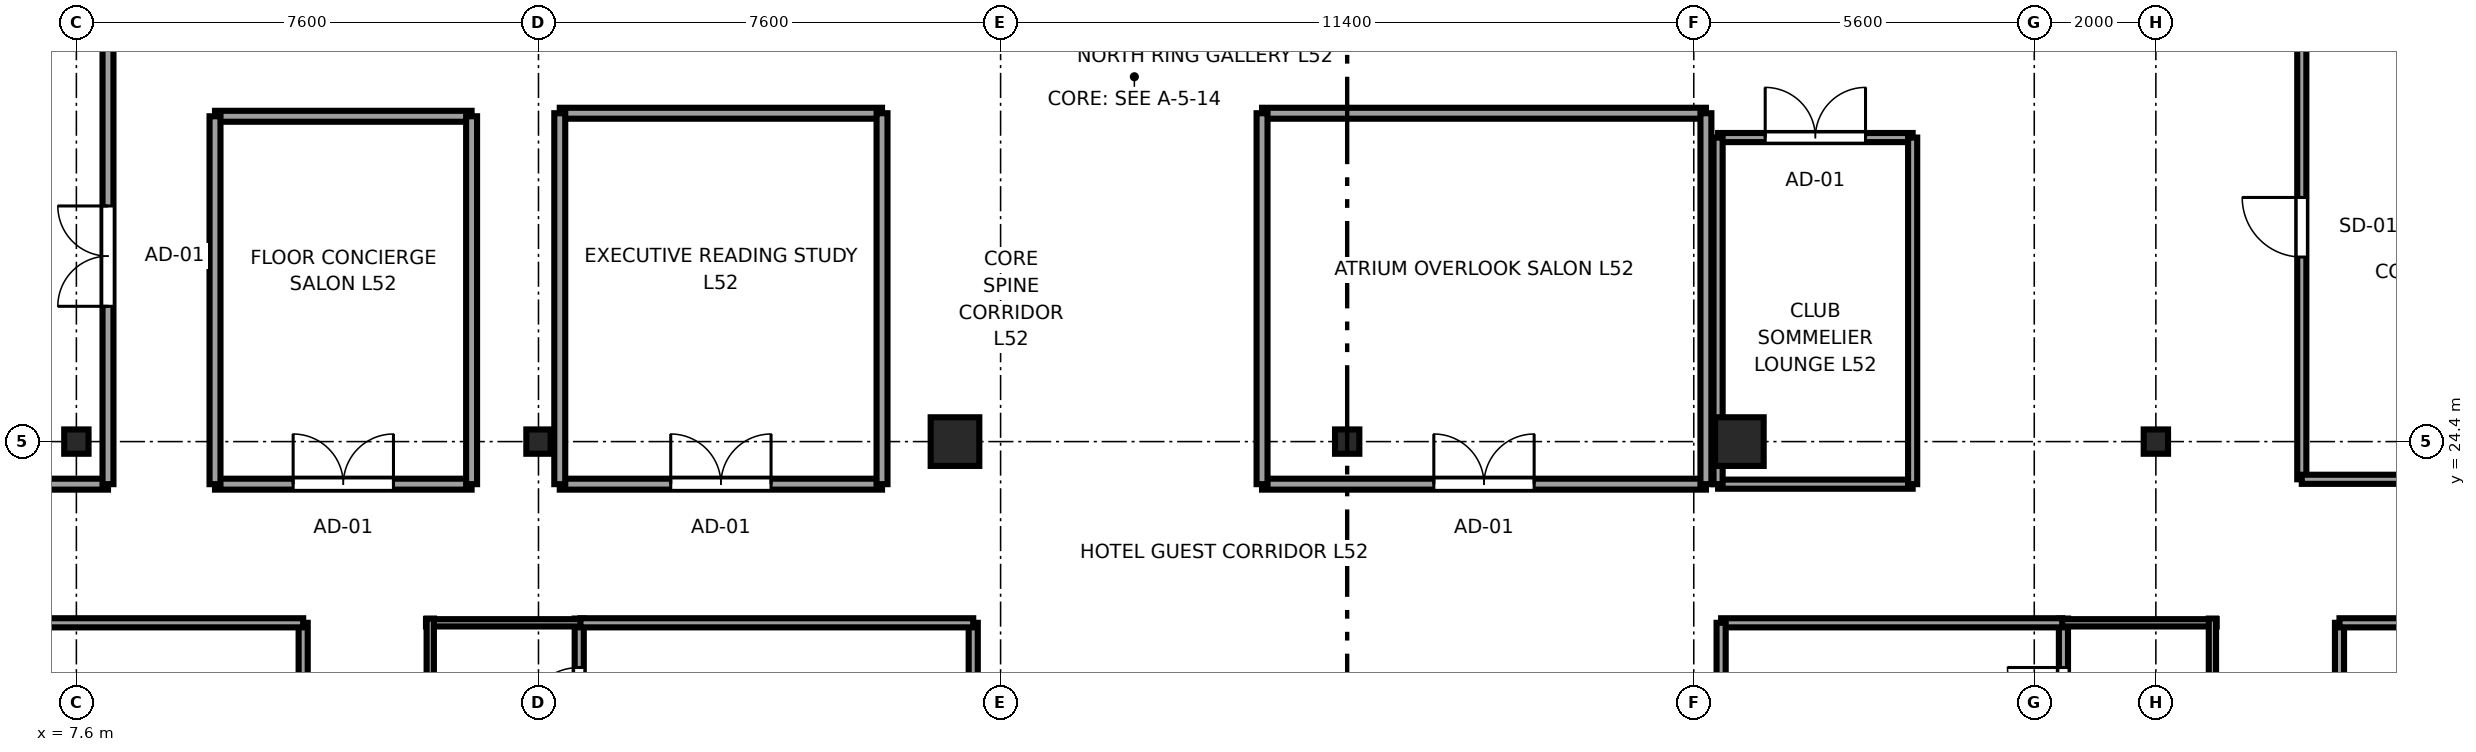
"""IFC4 building model, lengths in metres.
Left out: names, types, materials, properties, quantities, classifications, styles, units other than length and angle.
Written with IfcOpenShell. Run it as: python <this file> out.ifc"""

import sys

from ifc_helpers import new_model, si_unit, direction, frame, frame_2d, origin, origin_2d, place, context, subcontext, project, spatial, rectangle, i_section, extrude, source, transform, mapped, element, fill, save


model = new_model("IFC4")
c1 = context("Model", 3, precision=1e-05, world=origin(), true_north=direction((0.0, 1.0)))
c2 = subcontext(c1, "Body", "Model", "MODEL_VIEW")
j1 = project(units=[si_unit("LENGTHUNIT", "METRE"), si_unit("PLANEANGLEUNIT", "RADIAN")], contexts=[c1])
p1 = place(None, origin())
s1 = spatial("IfcSite", under=j1, at=p1, CompositionType="ELEMENT")
p2 = place(p1, origin())
s2 = spatial("IfcBuilding", under=s1, at=p2, CompositionType="ELEMENT")
p3 = place(p2, frame((0.0, 0.0, 198.2)))
s3 = spatial("IfcBuildingStorey", under=s2, at=p3, CompositionType="ELEMENT", Elevation=198.2)
m1 = source(origin(), c2, "Body", "SweptSolid", [
    extrude(i_section(OverallWidth=0.4, OverallDepth=0.4, WebThickness=0.02, FlangeThickness=0.035, at=origin_2d()), origin(), (0.0, 0.0, 1.0), 3.55),
])
for number, where, z_axis, x_axis in (
    (1, (7.6, 24.4, 0.0), (0.0, 0.0, 1.0), (1.0, 0.0, 0.0)),
    (2, (15.2, 24.4, 0.0), (0.0, 0.0, 1.0), (1.0, 0.0, 0.0)),
):
    element("IfcColumn", number, at=place(p3, frame(where, z_axis=z_axis, x_axis=x_axis)), inside=s3, PredefinedType="COLUMN", context=c2, shape_type="MappedRepresentation", body=[
        mapped(m1, transform((0.0, 0.0, 0.0), x_axis=(1.0, 0.0, 0.0), y_axis=(0.0, 1.0, 0.0), z_axis=(0.0, 0.0, 1.0), scale=1.0)),
    ])
m2 = source(origin(), c2, "Body", "SweptSolid", [
    extrude(rectangle(XDim=0.8, YDim=0.8, at=origin_2d()), origin(), (0.0, 0.0, 1.0), 3.55),
])
for number, where, z_axis, x_axis in (
    (3, (22.05, 24.4, 0.0), (0.0, 0.0, 1.0), (1.0, 0.0, 0.0)),
    (4, (34.95, 24.4, 0.0), (0.0, 0.0, 1.0), (1.0, 0.0, 0.0)),
):
    element("IfcColumn", number, at=place(p3, frame(where, z_axis=z_axis, x_axis=x_axis)), inside=s3, PredefinedType="COLUMN", context=c2, shape_type="MappedRepresentation", body=[
        mapped(m2, transform((0.0, 0.0, 0.0), x_axis=(1.0, 0.0, 0.0), y_axis=(0.0, 1.0, 0.0), z_axis=(0.0, 0.0, 1.0), scale=1.0)),
    ])
for number, where, z_axis, x_axis in (
    (5, (41.8, 24.4, 0.0), (0.0, 0.0, 1.0), (1.0, 0.0, 0.0)),
    (6, (28.5, 24.4, 0.0), (0.0, 0.0, 1.0), (1.0, 0.0, 0.0)),
):
    element("IfcColumn", number, at=place(p3, frame(where, z_axis=z_axis, x_axis=x_axis)), inside=s3, PredefinedType="COLUMN", context=c2, shape_type="MappedRepresentation", body=[
        mapped(m1, transform((0.0, 0.0, 0.0), x_axis=(1.0, 0.0, 0.0), y_axis=(0.0, 1.0, 0.0), z_axis=(0.0, 0.0, 1.0), scale=1.0)),
    ])
p4 = place(p3, frame((15.87, 19.1, 0.0), z_axis=(0.0, 0.0, 1.0), x_axis=(0.0, 1.0, 0.0)))
e7 = element("IfcWall", 7, at=p4, inside=s3, PredefinedType="PARTITIONING", context=c2, shape_type="SweptSolid", body=[
    extrude(rectangle(XDim=2.39, YDim=0.15, at=frame_2d((1.195, 0.0))), origin(), (0.0, 0.0, 1.0), 3.37),
])
p5 = place(p4, frame((0.665, 0.0, 0.0)))
e8 = element("IfcOpeningElement", 8, at=p5, cuts=e7, PredefinedType="OPENING", context=c2, shape_type="SweptSolid", body=[
    extrude(rectangle(XDim=0.92, YDim=2.01, at=frame_2d((0.46, 1.005))), frame((0.0, 0.085, 0.0), z_axis=(0.0, -1.0, 0.0), x_axis=(1.0, 0.0, 0.0)), (0.0, 0.0, 1.0), 0.17),
])
p6 = place(p3, frame((13.35, 21.42, 0.0), z_axis=(0.0, 0.0, 1.0), x_axis=(1.0, 0.0, 0.0)))
e9 = element("IfcWall", 9, at=p6, inside=s3, PredefinedType="PLUMBINGWALL", context=c2, shape_type="SweptSolid", body=[
    extrude(rectangle(XDim=2.59, YDim=0.12, at=frame_2d((1.295, 0.0))), origin(), (0.0, 0.0, 1.0), 3.37),
])
p7 = place(p3, frame((13.42, 19.1, 0.0), z_axis=(0.0, 0.0, 1.0), x_axis=(0.0, 1.0, 0.0)))
e10 = element("IfcWall", 10, at=p7, inside=s3, PredefinedType="PLUMBINGWALL", context=c2, shape_type="SweptSolid", body=[
    extrude(rectangle(XDim=2.39, YDim=0.12, at=frame_2d((1.195, 0.0))), origin(), (0.0, 0.0, 1.0), 3.37),
])
p8 = place(p3, frame((40.28, 19.1, 0.0), z_axis=(0.0, 0.0, 1.0), x_axis=(0.0, 1.0, 0.0)))
e11 = element("IfcWall", 11, at=p8, inside=s3, PredefinedType="PARTITIONING", context=c2, shape_type="SweptSolid", body=[
    extrude(rectangle(XDim=2.39, YDim=0.15, at=frame_2d((1.195, 0.0))), origin(), (0.0, 0.0, 1.0), 3.37),
])
p9 = place(p8, frame((0.665, 0.0, 0.0)))
e12 = element("IfcOpeningElement", 12, at=p9, cuts=e11, PredefinedType="OPENING", context=c2, shape_type="SweptSolid", body=[
    extrude(rectangle(XDim=0.92, YDim=2.01, at=frame_2d((0.46, 1.005))), frame((0.0, 0.085, 0.0), z_axis=(0.0, -1.0, 0.0), x_axis=(1.0, 0.0, 0.0)), (0.0, 0.0, 1.0), 0.17),
])
p10 = place(p3, frame((40.21, 21.42, 0.0), z_axis=(0.0, 0.0, 1.0), x_axis=(1.0, 0.0, 0.0)))
e13 = element("IfcWall", 13, at=p10, inside=s3, PredefinedType="PLUMBINGWALL", context=c2, shape_type="SweptSolid", body=[
    extrude(rectangle(XDim=2.59, YDim=0.12, at=frame_2d((1.295, 0.0))), origin(), (0.0, 0.0, 1.0), 3.37),
])
p11 = place(p3, frame((42.73, 19.1, 0.0), z_axis=(0.0, 0.0, 1.0), x_axis=(0.0, 1.0, 0.0)))
e14 = element("IfcWall", 14, at=p11, inside=s3, PredefinedType="PLUMBINGWALL", context=c2, shape_type="SweptSolid", body=[
    extrude(rectangle(XDim=2.39, YDim=0.12, at=frame_2d((1.195, 0.0))), origin(), (0.0, 0.0, 1.0), 3.37),
])
p12 = place(p3, frame((11.33, 14.61, 0.0), z_axis=(0.0, 0.0, 1.0), x_axis=(0.0, 1.0, 0.0)))
e15 = element("IfcWall", 15, at=p12, inside=s3, PredefinedType="PARTITIONING", context=c2, shape_type="SweptSolid", body=[
    extrude(rectangle(XDim=6.81, YDim=0.15, at=frame_2d((3.405, 0.0))), origin(), (0.0, 0.0, 1.0), 3.001),
])
p13 = place(p12, frame((2.895, 0.0, 0.0)))
e16 = element("IfcOpeningElement", 16, at=p13, cuts=e15, PredefinedType="OPENING", context=c2, shape_type="SweptSolid", body=[
    extrude(rectangle(XDim=0.98, YDim=2.12, at=frame_2d((0.49, 1.06))), frame((0.0, 0.085, 0.0), z_axis=(0.0, -1.0, 0.0), x_axis=(1.0, 0.0, 0.0)), (0.0, 0.0, 1.0), 0.17),
])
p14 = place(p3, frame((2.9, 21.42, 0.0), z_axis=(0.0, 0.0, 1.0), x_axis=(1.0, 0.0, 0.0)))
e17 = element("IfcWall", 17, at=p14, inside=s3, PredefinedType="PARTITIONING", context=c2, shape_type="SweptSolid", body=[
    extrude(rectangle(XDim=8.43, YDim=0.15, at=frame_2d((4.215, 0.0))), origin(), (0.0, 0.0, 1.0), 3.37),
])
p15 = place(p3, frame((22.35, 15.48, 0.0), z_axis=(0.0, 0.0, 1.0), x_axis=(0.0, 1.0, 0.0)))
e18 = element("IfcWall", 18, at=p15, inside=s3, PredefinedType="PARTITIONING", context=c2, shape_type="SweptSolid", body=[
    extrude(rectangle(XDim=5.94, YDim=0.15, at=frame_2d((2.97, 0.0))), origin(), (0.0, 0.0, 1.0), 3.37),
])
p16 = place(p3, frame((15.89, 21.42, 0.0), z_axis=(0.0, 0.0, 1.0), x_axis=(1.0, 0.0, 0.0)))
e19 = element("IfcWall", 19, at=p16, inside=s3, PredefinedType="PARTITIONING", context=c2, shape_type="SweptSolid", body=[
    extrude(rectangle(XDim=6.46, YDim=0.15, at=frame_2d((3.23, 0.0))), origin(), (0.0, 0.0, 1.0), 3.37),
])
p17 = place(p3, frame((34.65, 21.42, 0.0), z_axis=(0.0, 0.0, 1.0), x_axis=(1.0, 0.0, 0.0)))
e20 = element("IfcWall", 20, at=p17, inside=s3, PredefinedType="PARTITIONING", context=c2, shape_type="SweptSolid", body=[
    extrude(rectangle(XDim=5.61, YDim=0.15, at=frame_2d((2.805, 0.0))), origin(), (0.0, 0.0, 1.0), 3.37),
])
p18 = place(p3, frame((34.65, 15.28, 0.0), z_axis=(0.0, 0.0, 1.0), x_axis=(0.0, 1.0, 0.0)))
e21 = element("IfcWall", 21, at=p18, inside=s3, PredefinedType="PARTITIONING", context=c2, shape_type="SweptSolid", body=[
    extrude(rectangle(XDim=6.14, YDim=0.15, at=frame_2d((3.07, 0.0))), origin(), (0.0, 0.0, 1.0), 3.37),
])
p19 = place(p3, frame((44.82, 14.61, 0.0), z_axis=(0.0, 0.0, 1.0), x_axis=(0.0, 1.0, 0.0)))
e22 = element("IfcWall", 22, at=p19, inside=s3, PredefinedType="PARTITIONING", context=c2, shape_type="SweptSolid", body=[
    extrude(rectangle(XDim=6.81, YDim=0.15, at=frame_2d((3.405, 0.0))), origin(), (0.0, 0.0, 1.0), 3.37),
])
p20 = place(p19, frame((2.895, 0.0, 0.0)))
e23 = element("IfcOpeningElement", 23, at=p20, cuts=e22, PredefinedType="OPENING", context=c2, shape_type="SweptSolid", body=[
    extrude(rectangle(XDim=0.98, YDim=2.12, at=frame_2d((0.49, 1.06))), frame((0.0, 0.085, 0.0), z_axis=(0.0, -1.0, 0.0), x_axis=(1.0, 0.0, 0.0)), (0.0, 0.0, 1.0), 0.17),
])
p21 = place(p3, frame((44.82, 21.42, 0.0), z_axis=(0.0, 0.0, 1.0), x_axis=(1.0, 0.0, 0.0)))
e24 = element("IfcWall", 24, at=p21, inside=s3, PredefinedType="PARTITIONING", context=c2, shape_type="SweptSolid", body=[
    extrude(rectangle(XDim=9.175, YDim=0.15, at=frame_2d((4.587, 0.0))), origin(), (0.0, 0.0, 1.0), 3.37),
])
p22 = place(p3, frame((2.9, 23.7, 0.0), z_axis=(0.0, 0.0, 1.0), x_axis=(1.0, 0.0, 0.0)))
e25 = element("IfcWall", 25, at=p22, inside=s3, PredefinedType="PARTITIONING", context=c2, shape_type="SweptSolid", body=[
    extrude(rectangle(XDim=5.22, YDim=0.18, at=frame_2d((2.61, 0.0))), origin(), (0.0, 0.0, 1.0), 3.37),
])
p23 = place(p3, frame((8.12, 23.7, 0.0), z_axis=(0.0, 0.0, 1.0), x_axis=(0.0, 1.0, 0.0)))
e26 = element("IfcWall", 26, at=p23, inside=s3, PredefinedType="PARTITIONING", context=c2, shape_type="SweptSolid", body=[
    extrude(rectangle(XDim=7.5, YDim=0.18, at=frame_2d((3.75, 0.0))), origin(), (0.0, 0.0, 1.0), 3.37),
])
p24 = place(p23, frame((2.925, 0.0, 0.0)))
e27 = element("IfcOpeningElement", 27, at=p24, cuts=e26, PredefinedType="OPENING", context=c2, shape_type="SweptSolid", body=[
    extrude(rectangle(XDim=1.65, YDim=2.15, at=frame_2d((0.825, 1.075))), frame((0.0, 0.1, 0.0), z_axis=(0.0, -1.0, 0.0), x_axis=(1.0, 0.0, 0.0)), (0.0, 0.0, 1.0), 0.2),
])
p25 = place(p3, frame((44.2, 23.78, 0.0), z_axis=(0.0, 0.0, 1.0), x_axis=(0.0, 1.0, 0.0)))
e28 = element("IfcWall", 28, at=p25, inside=s3, PredefinedType="PARTITIONING", context=c2, shape_type="SweptSolid", body=[
    extrude(rectangle(XDim=8.29, YDim=0.15, at=frame_2d((4.145, 0.0))), origin(), (0.0, 0.0, 1.0), 3.37),
])
p26 = place(p25, frame((3.655, 0.0, 0.0)))
e29 = element("IfcOpeningElement", 29, at=p26, cuts=e28, PredefinedType="OPENING", context=c2, shape_type="SweptSolid", body=[
    extrude(rectangle(XDim=0.98, YDim=2.12, at=frame_2d((0.49, 1.06))), frame((0.0, 0.085, 0.0), z_axis=(0.0, -1.0, 0.0), x_axis=(1.0, 0.0, 0.0)), (0.0, 0.0, 1.0), 0.17),
])
p27 = place(p3, frame((44.2, 23.78, 0.0), z_axis=(0.0, 0.0, 1.0), x_axis=(1.0, 0.0, 0.0)))
e30 = element("IfcWall", 30, at=p27, inside=s3, PredefinedType="PARTITIONING", context=c2, shape_type="SweptSolid", body=[
    extrude(rectangle(XDim=9.795, YDim=0.15, at=frame_2d((4.897, 0.0))), origin(), (0.0, 0.0, 1.0), 3.37),
])
p28 = place(p3, frame((9.88, 23.7, 0.0), z_axis=(0.0, 0.0, 1.0), x_axis=(1.0, 0.0, 0.0)))
e31 = element("IfcWall", 31, at=p28, inside=s3, PredefinedType="PARTITIONING", context=c2, shape_type="SweptSolid", body=[
    extrude(rectangle(XDim=4.22, YDim=0.18, at=frame_2d((2.11, 0.0))), origin(), (0.0, 0.0, 1.0), 3.37),
])
p29 = place(p28, frame((1.285, 0.0, 0.0)))
e32 = element("IfcOpeningElement", 32, at=p29, cuts=e31, PredefinedType="OPENING", context=c2, shape_type="SweptSolid", body=[
    extrude(rectangle(XDim=1.65, YDim=2.15, at=frame_2d((0.825, 1.075))), frame((0.0, 0.1, 0.0), z_axis=(0.0, -1.0, 0.0), x_axis=(1.0, 0.0, 0.0)), (0.0, 0.0, 1.0), 0.2),
])
p30 = place(p3, frame((9.88, 29.75, 0.0), z_axis=(0.0, 0.0, 1.0), x_axis=(1.0, 0.0, 0.0)))
e33 = element("IfcWall", 33, at=p30, inside=s3, PredefinedType="PARTITIONING", context=c2, shape_type="SweptSolid", body=[
    extrude(rectangle(XDim=4.22, YDim=0.18, at=frame_2d((2.11, 0.0))), origin(), (0.0, 0.0, 1.0), 3.37),
])
for number, where, z_axis, x_axis in (
    (34, (9.88, 23.7, 0.0), (0.0, 0.0, 1.0), (0.0, 1.0, 0.0)),
    (35, (14.1, 23.7, 0.0), (0.0, 0.0, 1.0), (0.0, 1.0, 0.0)),
):
    element("IfcWall", number, at=place(p3, frame(where, z_axis=z_axis, x_axis=x_axis)), inside=s3, PredefinedType="PARTITIONING", context=c2, shape_type="SweptSolid", body=[
        extrude(rectangle(XDim=6.05, YDim=0.18, at=frame_2d((3.025, 0.0))), origin(), (0.0, 0.0, 1.0), 3.37),
    ])
p31 = place(p3, frame((27.1, 23.7, 0.0), z_axis=(0.0, 0.0, 1.0), x_axis=(1.0, 0.0, 0.0)))
e36 = element("IfcWall", 36, at=p31, inside=s3, PredefinedType="PARTITIONING", context=c2, shape_type="SweptSolid", body=[
    extrude(rectangle(XDim=7.3, YDim=0.18, at=frame_2d((3.65, 0.0))), origin(), (0.0, 0.0, 1.0), 3.37),
])
p32 = place(p31, frame((2.825, 0.0, 0.0)))
e37 = element("IfcOpeningElement", 37, at=p32, cuts=e36, PredefinedType="OPENING", context=c2, shape_type="SweptSolid", body=[
    extrude(rectangle(XDim=1.65, YDim=2.15, at=frame_2d((0.825, 1.075))), frame((0.0, 0.1, 0.0), z_axis=(0.0, -1.0, 0.0), x_axis=(1.0, 0.0, 0.0)), (0.0, 0.0, 1.0), 0.2),
])
p33 = place(p3, frame((27.1, 29.8, 0.0), z_axis=(0.0, 0.0, 1.0), x_axis=(1.0, 0.0, 0.0)))
e38 = element("IfcWall", 38, at=p33, inside=s3, PredefinedType="PARTITIONING", context=c2, shape_type="SweptSolid", body=[
    extrude(rectangle(XDim=7.3, YDim=0.18, at=frame_2d((3.65, 0.0))), origin(), (0.0, 0.0, 1.0), 3.37),
])
for number, where, z_axis, x_axis in (
    (39, (27.1, 23.7, 0.0), (0.0, 0.0, 1.0), (0.0, 1.0, 0.0)),
    (40, (34.4, 23.7, 0.0), (0.0, 0.0, 1.0), (0.0, 1.0, 0.0)),
):
    element("IfcWall", number, at=place(p3, frame(where, z_axis=z_axis, x_axis=x_axis)), inside=s3, PredefinedType="PARTITIONING", context=c2, shape_type="SweptSolid", body=[
        extrude(rectangle(XDim=6.1, YDim=0.18, at=frame_2d((3.05, 0.0))), origin(), (0.0, 0.0, 1.0), 3.37),
    ])
p34 = place(p3, frame((15.55, 23.7, 0.0), z_axis=(0.0, 0.0, 1.0), x_axis=(1.0, 0.0, 0.0)))
e41 = element("IfcWall", 41, at=p34, inside=s3, PredefinedType="PARTITIONING", context=c2, shape_type="SweptSolid", body=[
    extrude(rectangle(XDim=5.3, YDim=0.18, at=frame_2d((2.65, 0.0))), origin(), (0.0, 0.0, 1.0), 3.37),
])
p35 = place(p34, frame((1.825, 0.0, 0.0)))
e42 = element("IfcOpeningElement", 42, at=p35, cuts=e41, PredefinedType="OPENING", context=c2, shape_type="SweptSolid", body=[
    extrude(rectangle(XDim=1.65, YDim=2.15, at=frame_2d((0.825, 1.075))), frame((0.0, 0.1, 0.0), z_axis=(0.0, -1.0, 0.0), x_axis=(1.0, 0.0, 0.0)), (0.0, 0.0, 1.0), 0.2),
])
p36 = place(p3, frame((15.55, 29.8, 0.0), z_axis=(0.0, 0.0, 1.0), x_axis=(1.0, 0.0, 0.0)))
e43 = element("IfcWall", 43, at=p36, inside=s3, PredefinedType="PARTITIONING", context=c2, shape_type="SweptSolid", body=[
    extrude(rectangle(XDim=5.3, YDim=0.18, at=frame_2d((2.65, 0.0))), origin(), (0.0, 0.0, 1.0), 3.37),
])
for number, where, z_axis, x_axis in (
    (44, (15.55, 23.7, 0.0), (0.0, 0.0, 1.0), (0.0, 1.0, 0.0)),
    (45, (20.85, 23.7, 0.0), (0.0, 0.0, 1.0), (0.0, 1.0, 0.0)),
):
    element("IfcWall", number, at=place(p3, frame(where, z_axis=z_axis, x_axis=x_axis)), inside=s3, PredefinedType="PARTITIONING", context=c2, shape_type="SweptSolid", body=[
        extrude(rectangle(XDim=6.1, YDim=0.18, at=frame_2d((3.05, 0.0))), origin(), (0.0, 0.0, 1.0), 3.37),
    ])
p37 = place(p3, frame((34.6, 23.7, 0.0), z_axis=(0.0, 0.0, 1.0), x_axis=(1.0, 0.0, 0.0)))
e46 = element("IfcWall", 46, at=p37, inside=s3, PredefinedType="PARTITIONING", context=c2, shape_type="SweptSolid", body=[
    extrude(rectangle(XDim=3.2, YDim=0.15, at=frame_2d((1.6, 0.0))), origin(), (0.0, 0.0, 1.0), 3.37),
])
p38 = place(p3, frame((34.6, 29.4, 0.0), z_axis=(0.0, 0.0, 1.0), x_axis=(1.0, 0.0, 0.0)))
e47 = element("IfcWall", 47, at=p38, inside=s3, PredefinedType="PARTITIONING", context=c2, shape_type="SweptSolid", body=[
    extrude(rectangle(XDim=3.2, YDim=0.15, at=frame_2d((1.6, 0.0))), origin(), (0.0, 0.0, 1.0), 3.37),
])
p39 = place(p38, frame((0.775, 0.0, 0.0)))
e48 = element("IfcOpeningElement", 48, at=p39, cuts=e47, PredefinedType="OPENING", context=c2, shape_type="SweptSolid", body=[
    extrude(rectangle(XDim=1.65, YDim=2.15, at=frame_2d((0.825, 1.075))), frame((0.0, 0.085, 0.0), z_axis=(0.0, -1.0, 0.0), x_axis=(1.0, 0.0, 0.0)), (0.0, 0.0, 1.0), 0.17),
])
for number, where, z_axis, x_axis in (
    (49, (34.6, 23.7, 0.0), (0.0, 0.0, 1.0), (0.0, 1.0, 0.0)),
    (50, (37.8, 23.7, 0.0), (0.0, 0.0, 1.0), (0.0, 1.0, 0.0)),
):
    element("IfcWall", number, at=place(p3, frame(where, z_axis=z_axis, x_axis=x_axis)), inside=s3, PredefinedType="PARTITIONING", context=c2, shape_type="SweptSolid", body=[
        extrude(rectangle(XDim=5.7, YDim=0.15, at=frame_2d((2.85, 0.0))), origin(), (0.0, 0.0, 1.0), 3.37),
    ])
m3 = source(origin(), c2, "Body", "SweptSolid", [
    extrude(rectangle(XDim=0.92, YDim=2.01, at=frame_2d((0.46, 1.005))), frame((0.0, 0.025, 0.0), z_axis=(0.0, -1.0, 0.0), x_axis=(1.0, 0.0, 0.0)), (0.0, 0.0, 1.0), 0.05),
])
p40 = place(p5, origin())
e51 = element("IfcDoor", 51, at=p40, inside=s3, OperationType="SINGLE_SWING_LEFT", PredefinedType="DOOR", context=c2, shape_type="MappedRepresentation", body=[
    mapped(m3, transform((0.0, 0.0, 0.0), x_axis=(1.0, 0.0, 0.0), y_axis=(0.0, 1.0, 0.0), z_axis=(0.0, 0.0, 1.0), scale=1.0)),
])
fill(e8, e51)
p41 = place(p9, origin())
e52 = element("IfcDoor", 52, at=p41, inside=s3, OperationType="SINGLE_SWING_RIGHT", PredefinedType="DOOR", context=c2, shape_type="MappedRepresentation", body=[
    mapped(m3, transform((0.0, 0.0, 0.0), x_axis=(1.0, 0.0, 0.0), y_axis=(0.0, 1.0, 0.0), z_axis=(0.0, 0.0, 1.0), scale=1.0)),
])
fill(e12, e52)
m4 = source(origin(), c2, "Body", "SweptSolid", [
    extrude(rectangle(XDim=1.65, YDim=2.15, at=frame_2d((0.825, 1.075))), frame((0.0, 0.025, 0.0), z_axis=(0.0, -1.0, 0.0), x_axis=(1.0, 0.0, 0.0)), (0.0, 0.0, 1.0), 0.05),
])
p42 = place(p24, origin())
e53 = element("IfcDoor", 53, at=p42, inside=s3, OperationType="DOUBLE_DOOR_SINGLE_SWING", PredefinedType="DOOR", context=c2, shape_type="MappedRepresentation", body=[
    mapped(m4, transform((0.0, 0.0, 0.0), x_axis=(1.0, 0.0, 0.0), y_axis=(0.0, 1.0, 0.0), z_axis=(0.0, 0.0, 1.0), scale=1.0)),
])
fill(e27, e53)
m5 = source(origin(), c2, "Body", "SweptSolid", [
    extrude(rectangle(XDim=0.98, YDim=2.12, at=frame_2d((0.49, 1.06))), frame((0.0, 0.025, 0.0), z_axis=(0.0, -1.0, 0.0), x_axis=(1.0, 0.0, 0.0)), (0.0, 0.0, 1.0), 0.05),
])
p43 = place(p26, origin())
e54 = element("IfcDoor", 54, at=p43, inside=s3, OperationType="SINGLE_SWING_RIGHT", PredefinedType="DOOR", context=c2, shape_type="MappedRepresentation", body=[
    mapped(m5, transform((0.0, 0.0, 0.0), x_axis=(1.0, 0.0, 0.0), y_axis=(0.0, 1.0, 0.0), z_axis=(0.0, 0.0, 1.0), scale=1.0)),
])
fill(e29, e54)
p44 = place(p29, origin())
e55 = element("IfcDoor", 55, at=p44, inside=s3, OperationType="DOUBLE_DOOR_SINGLE_SWING", PredefinedType="DOOR", context=c2, shape_type="MappedRepresentation", body=[
    mapped(m4, transform((0.0, 0.0, 0.0), x_axis=(1.0, 0.0, 0.0), y_axis=(0.0, 1.0, 0.0), z_axis=(0.0, 0.0, 1.0), scale=1.0)),
])
fill(e32, e55)
p45 = place(p32, origin())
e56 = element("IfcDoor", 56, at=p45, inside=s3, OperationType="DOUBLE_DOOR_SINGLE_SWING", PredefinedType="DOOR", context=c2, shape_type="MappedRepresentation", body=[
    mapped(m4, transform((0.0, 0.0, 0.0), x_axis=(1.0, 0.0, 0.0), y_axis=(0.0, 1.0, 0.0), z_axis=(0.0, 0.0, 1.0), scale=1.0)),
])
fill(e37, e56)
p46 = place(p35, origin())
e57 = element("IfcDoor", 57, at=p46, inside=s3, OperationType="DOUBLE_DOOR_SINGLE_SWING", PredefinedType="DOOR", context=c2, shape_type="MappedRepresentation", body=[
    mapped(m4, transform((0.0, 0.0, 0.0), x_axis=(1.0, 0.0, 0.0), y_axis=(0.0, 1.0, 0.0), z_axis=(0.0, 0.0, 1.0), scale=1.0)),
])
fill(e42, e57)
p47 = place(p39, origin())
e58 = element("IfcDoor", 58, at=p47, inside=s3, OperationType="DOUBLE_DOOR_SINGLE_SWING", PredefinedType="DOOR", context=c2, shape_type="MappedRepresentation", body=[
    mapped(m4, transform((0.0, 0.0, 0.0), x_axis=(1.0, 0.0, 0.0), y_axis=(0.0, 1.0, 0.0), z_axis=(0.0, 0.0, 1.0), scale=1.0)),
])
fill(e48, e58)
save(model, sys.argv[1])
